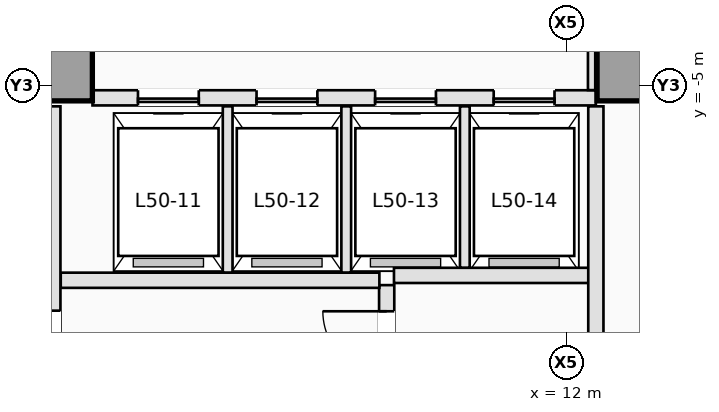
"""IFC4 building model, lengths in metres.
Left out: names, types, materials, properties, quantities, classifications, styles, units other than length and angle.
Written with IfcOpenShell. Run it as: python <this file> out.ifc"""

import sys

from ifc_helpers import new_model, si_unit, direction, frame, frame_2d, origin, origin_2d, place, context, subcontext, project, spatial, rectangle, extrude, element, fill, save


model = new_model("IFC4")
c1 = context("Model", 3, precision=1e-05, world=origin(), true_north=direction((0.0, 1.0)))
c2 = subcontext(c1, "Body", "Model", "MODEL_VIEW")
j1 = project(units=[si_unit("LENGTHUNIT", "METRE"), si_unit("PLANEANGLEUNIT", "RADIAN")], contexts=[c1])
p1 = place(None, origin())
s1 = spatial("IfcSite", under=j1, at=p1, CompositionType="ELEMENT")
p2 = place(p1, origin())
s2 = spatial("IfcBuilding", under=s1, at=p2, CompositionType="ELEMENT")
p3 = place(p2, frame((0.0, 0.0, 183.4)))
s3 = spatial("IfcBuildingStorey", under=s2, at=p3, CompositionType="ELEMENT", Elevation=183.4)
for number, where, z_axis, x_axis in (
    (1, (3.75, -4.8, 0.0), (0.0, 0.0, 1.0), (1.0, 0.0, 0.0)),
    (2, (12.95, -4.8, 0.0), (0.0, 0.0, 1.0), (1.0, 0.0, 0.0)),
):
    element("IfcColumn", number, at=place(p3, frame(where, z_axis=z_axis, x_axis=x_axis)), inside=s3, PredefinedType="COLUMN", context=c2, shape_type="SweptSolid", body=[
        extrude(rectangle(XDim=0.9, YDim=0.9, at=origin_2d()), origin(), (0.0, 0.0, 1.0), 3.5),
    ])
p4 = place(p3, frame((9.04, -10.18, 0.0), z_axis=(0.0, 0.0, 1.0), x_axis=(0.0, 1.0, 0.0)))
e3 = element("IfcWall", 3, at=p4, inside=s3, PredefinedType="PARTITIONING", context=c2, shape_type="SweptSolid", body=[
    extrude(rectangle(XDim=1.9, YDim=0.25, at=frame_2d((0.95, 0.0))), origin(), (0.0, 0.0, 1.0), 3.25),
])
p5 = place(p4, frame((0.42, 0.0, 0.0)))
e4 = element("IfcOpeningElement", 4, at=p5, cuts=e3, PredefinedType="OPENING", context=c2, shape_type="SweptSolid", body=[
    extrude(rectangle(XDim=1.05, YDim=2.15, at=frame_2d((0.525, 1.075))), frame((0.0, 0.135, 0.0), z_axis=(0.0, -1.0, 0.0), x_axis=(1.0, 0.0, 0.0)), (0.0, 0.0, 1.0), 0.27),
])
p6 = place(p3, frame((9.16, -8.12, 0.0), z_axis=(0.0, 0.0, 1.0), x_axis=(1.0, 0.0, 0.0)))
e5 = element("IfcWall", 5, at=p6, inside=s3, PredefinedType="PARTITIONING", context=c2, shape_type="SweptSolid", body=[
    extrude(rectangle(XDim=3.22, YDim=0.25, at=frame_2d((1.61, 0.0))), origin(), (0.0, 0.0, 1.0), 3.25),
])
p7 = place(p3, frame((12.48, -10.18, 0.0), z_axis=(0.0, 0.0, 1.0), x_axis=(0.0, 1.0, 0.0)))
e6 = element("IfcWall", 6, at=p7, inside=s3, PredefinedType="PARTITIONING", context=c2, shape_type="SweptSolid", body=[
    extrude(rectangle(XDim=4.84, YDim=0.25, at=frame_2d((2.42, 0.0))), origin(), (0.0, 0.0, 1.0), 3.25),
])
p8 = place(p3, frame((3.68, -8.2, 0.0), z_axis=(0.0, 0.0, 1.0), x_axis=(1.0, 0.0, 0.0)))
e7 = element("IfcWall", 7, at=p8, inside=s3, PredefinedType="PARTITIONING", context=c2, shape_type="SweptSolid", body=[
    extrude(rectangle(XDim=5.24, YDim=0.25, at=frame_2d((2.62, 0.0))), origin(), (0.0, 0.0, 1.0), 3.25),
])
p9 = place(p3, frame((3.55, -15.898, 0.0), z_axis=(0.0, 0.0, 1.0), x_axis=(0.0, 1.0, 0.0)))
e8 = element("IfcWall", 8, at=p9, inside=s3, PredefinedType="PARTITIONING", context=c2, shape_type="SweptSolid", body=[
    extrude(rectangle(XDim=10.558, YDim=0.25, at=frame_2d((5.279, 0.0))), origin(), (0.0, 0.0, 1.0), 3.25),
])
p10 = place(p9, frame((6.198, 0.0, 0.0)))
e9 = element("IfcOpeningElement", 9, at=p10, cuts=e8, PredefinedType="OPENING", context=c2, shape_type="SweptSolid", body=[
    extrude(rectangle(XDim=1.0, YDim=2.15, at=frame_2d((0.5, 1.075))), frame((0.0, 0.135, 0.0), z_axis=(0.0, -1.0, 0.0), x_axis=(1.0, 0.0, 0.0)), (0.0, 0.0, 1.0), 0.27),
])
p11 = place(p3, frame((4.202, -5.2, 0.0), z_axis=(0.0, 0.0, 1.0), x_axis=(1.0, 0.0, 0.0)))
e10 = element("IfcWall", 10, at=p11, inside=s3, PredefinedType="PARTITIONING", context=c2, shape_type="SweptSolid", body=[
    extrude(rectangle(XDim=8.278, YDim=0.25, at=frame_2d((4.139, 0.0))), origin(), (0.0, 0.0, 1.0), 3.25),
])
p12 = place(p11, frame((0.748, 0.0, 0.0)))
e11 = element("IfcOpeningElement", 11, at=p12, cuts=e10, PredefinedType="OPENING", context=c2, shape_type="SweptSolid", body=[
    extrude(rectangle(XDim=1.0, YDim=2.15, at=frame_2d((0.5, 1.075))), frame((0.0, 0.135, 0.0), z_axis=(0.0, -1.0, 0.0), x_axis=(1.0, 0.0, 0.0)), (0.0, 0.0, 1.0), 0.27),
])
p13 = place(p11, frame((2.698, 0.0, 0.0)))
e12 = element("IfcOpeningElement", 12, at=p13, cuts=e10, PredefinedType="OPENING", context=c2, shape_type="SweptSolid", body=[
    extrude(rectangle(XDim=1.0, YDim=2.15, at=frame_2d((0.5, 1.075))), frame((0.0, 0.135, 0.0), z_axis=(0.0, -1.0, 0.0), x_axis=(1.0, 0.0, 0.0)), (0.0, 0.0, 1.0), 0.27),
])
p14 = place(p11, frame((4.648, 0.0, 0.0)))
e13 = element("IfcOpeningElement", 13, at=p14, cuts=e10, PredefinedType="OPENING", context=c2, shape_type="SweptSolid", body=[
    extrude(rectangle(XDim=1.0, YDim=2.15, at=frame_2d((0.5, 1.075))), frame((0.0, 0.135, 0.0), z_axis=(0.0, -1.0, 0.0), x_axis=(1.0, 0.0, 0.0)), (0.0, 0.0, 1.0), 0.27),
])
p15 = place(p11, frame((6.598, 0.0, 0.0)))
e14 = element("IfcOpeningElement", 14, at=p15, cuts=e10, PredefinedType="OPENING", context=c2, shape_type="SweptSolid", body=[
    extrude(rectangle(XDim=1.0, YDim=2.15, at=frame_2d((0.5, 1.075))), frame((0.0, 0.135, 0.0), z_axis=(0.0, -1.0, 0.0), x_axis=(1.0, 0.0, 0.0)), (0.0, 0.0, 1.0), 0.27),
])
for number, where, z_axis, x_axis in (
    (15, (6.425, -8.073, 0.0), (0.0, 0.0, 1.0), (0.0, 1.0, 0.0)),
    (16, (8.375, -8.073, 0.0), (0.0, 0.0, 1.0), (0.0, 1.0, 0.0)),
):
    element("IfcWall", number, at=place(p3, frame(where, z_axis=z_axis, x_axis=x_axis)), inside=s3, PredefinedType="PARTITIONING", context=c2, shape_type="SweptSolid", body=[
        extrude(rectangle(XDim=2.733, YDim=0.16, at=frame_2d((1.366, 0.0))), origin(), (0.0, 0.0, 1.0), 3.25),
    ])
p16 = place(p3, frame((10.325, -7.993, 0.0), z_axis=(0.0, 0.0, 1.0), x_axis=(0.0, 1.0, 0.0)))
e17 = element("IfcWall", 17, at=p16, inside=s3, PredefinedType="PARTITIONING", context=c2, shape_type="SweptSolid", body=[
    extrude(rectangle(XDim=2.653, YDim=0.16, at=frame_2d((1.326, 0.0))), origin(), (0.0, 0.0, 1.0), 3.25),
])
p17 = place(p3, frame((12.41, -2.462, 0.0), z_axis=(0.0, 0.0, 1.0), x_axis=(0.0, -1.0, 0.0)))
e18 = element("IfcWall", 18, at=p17, inside=s3, PredefinedType="PARTITIONING", context=c2, shape_type="SweptSolid", body=[
    extrude(rectangle(XDim=2.611, YDim=0.12, at=frame_2d((1.306, 0.0))), origin(), (0.0, 0.0, 1.0), 3.25),
])
p18 = place(p12, origin())
e19 = element("IfcDoor", 19, at=p18, inside=s3, OperationType="SLIDING_TO_RIGHT", PredefinedType="DOOR", context=c2, shape_type="SweptSolid", body=[
    extrude(rectangle(XDim=1.0, YDim=2.15, at=frame_2d((0.5, 1.075))), frame((0.0, 0.025, 0.0), z_axis=(0.0, -1.0, 0.0), x_axis=(1.0, 0.0, 0.0)), (0.0, 0.0, 1.0), 0.05),
])
fill(e11, e19)
p19 = place(p13, origin())
e20 = element("IfcDoor", 20, at=p19, inside=s3, OperationType="SLIDING_TO_RIGHT", PredefinedType="DOOR", context=c2, shape_type="SweptSolid", body=[
    extrude(rectangle(XDim=1.0, YDim=2.15, at=frame_2d((0.5, 1.075))), frame((0.0, 0.025, 0.0), z_axis=(0.0, -1.0, 0.0), x_axis=(1.0, 0.0, 0.0)), (0.0, 0.0, 1.0), 0.05),
])
fill(e12, e20)
p20 = place(p14, origin())
e21 = element("IfcDoor", 21, at=p20, inside=s3, OperationType="SLIDING_TO_RIGHT", PredefinedType="DOOR", context=c2, shape_type="SweptSolid", body=[
    extrude(rectangle(XDim=1.0, YDim=2.15, at=frame_2d((0.5, 1.075))), frame((0.0, 0.025, 0.0), z_axis=(0.0, -1.0, 0.0), x_axis=(1.0, 0.0, 0.0)), (0.0, 0.0, 1.0), 0.05),
])
fill(e13, e21)
p21 = place(p15, origin())
e22 = element("IfcDoor", 22, at=p21, inside=s3, OperationType="SLIDING_TO_RIGHT", PredefinedType="DOOR", context=c2, shape_type="SweptSolid", body=[
    extrude(rectangle(XDim=1.0, YDim=2.15, at=frame_2d((0.5, 1.075))), frame((0.0, 0.025, 0.0), z_axis=(0.0, -1.0, 0.0), x_axis=(1.0, 0.0, 0.0)), (0.0, 0.0, 1.0), 0.05),
])
fill(e14, e22)
p22 = place(p5, origin())
e23 = element("IfcDoor", 23, at=p22, inside=s3, OperationType="SINGLE_SWING_RIGHT", PredefinedType="DOOR", context=c2, shape_type="SweptSolid", body=[
    extrude(rectangle(XDim=1.05, YDim=2.15, at=frame_2d((0.525, 1.075))), frame((0.0, 0.025, 0.0), z_axis=(0.0, -1.0, 0.0), x_axis=(1.0, 0.0, 0.0)), (0.0, 0.0, 1.0), 0.05),
])
fill(e4, e23)
p23 = place(p10, origin())
e24 = element("IfcDoor", 24, at=p23, inside=s3, OperationType="SINGLE_SWING_LEFT", PredefinedType="DOOR", context=c2, shape_type="SweptSolid", body=[
    extrude(rectangle(XDim=1.0, YDim=2.15, at=frame_2d((0.5, 1.075))), frame((0.0, 0.025, 0.0), z_axis=(0.0, -1.0, 0.0), x_axis=(1.0, 0.0, 0.0)), (0.0, 0.0, 1.0), 0.05),
])
fill(e9, e24)
save(model, sys.argv[1])
